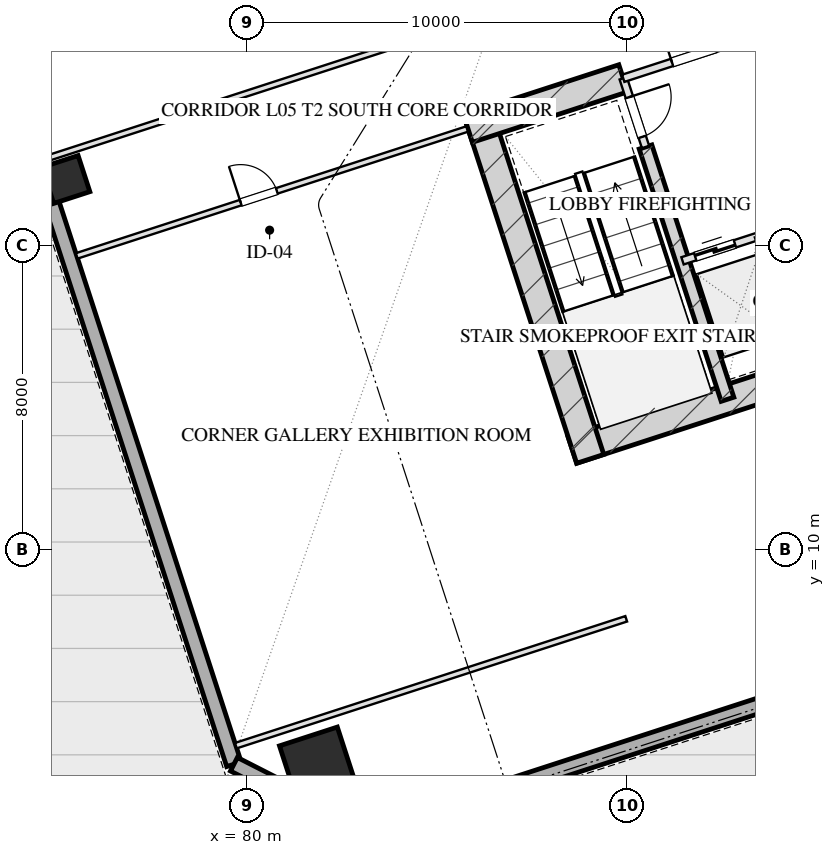
"""IFC4 building model, lengths in metres.
Left out: names, types, materials, properties, quantities, classifications, styles, units other than length and angle.
Written with IfcOpenShell. Run it as: python <this file> out.ifc"""

import sys

from ifc_helpers import new_model, si_unit, direction, frame, frame_2d, origin, origin_2d, place, context, subcontext, project, spatial, rectangle, hollow_rectangle, extrude, element, fill, save


model = new_model("IFC4")
c1 = context("Model", 3, precision=1e-05, world=origin(), true_north=direction((0.0, 1.0)))
c2 = subcontext(c1, "Body", "Model", "MODEL_VIEW")
j1 = project(units=[si_unit("LENGTHUNIT", "METRE"), si_unit("PLANEANGLEUNIT", "RADIAN")], contexts=[c1])
p1 = place(None, origin())
s1 = spatial("IfcSite", under=j1, at=p1, CompositionType="ELEMENT")
p2 = place(p1, origin())
s2 = spatial("IfcBuilding", under=s1, at=p2, CompositionType="ELEMENT")
p3 = place(p2, frame((0.0, 0.0, 26.0)))
s3 = spatial("IfcBuildingStorey", under=s2, at=p3, CompositionType="ELEMENT", Elevation=26.0)
p4 = place(p3, frame((88.559, 12.629, 0.0), z_axis=(0.0, 0.0, 1.0), x_axis=(0.951056072937, 0.309018358888, 0.0)))
e1 = element("IfcWall", 1, at=p4, inside=s3, PredefinedType="SHEAR", context=c2, shape_type="SweptSolid", body=[
    extrude(rectangle(XDim=16.55, YDim=0.75, at=frame_2d((8.275, 0.0))), origin(), (0.0, 0.0, 1.0), 4.0),
])
p5 = place(p3, frame((86.055, 21.546, 0.0), z_axis=(0.0, 0.0, 1.0), x_axis=(0.309023585745, -0.951054374604, 0.0)))
e2 = element("IfcWall", 2, at=p5, inside=s3, PredefinedType="SHEAR", context=c2, shape_type="SweptSolid", body=[
    extrude(rectangle(XDim=9.63, YDim=0.75, at=frame_2d((4.815, 0.0))), origin(), (0.0, 0.0, 1.0), 4.0),
])
p6 = place(p3, frame((90.486, 20.594, 0.0), z_axis=(0.0, 0.0, 1.0), x_axis=(0.309020428229, -0.951055400562, 0.0)))
e3 = element("IfcWall", 3, at=p6, inside=s3, PredefinedType="SHEAR", context=c2, shape_type="SweptSolid", body=[
    extrude(rectangle(XDim=6.98, YDim=0.35, at=frame_2d((3.49, 0.0))), origin(), (0.0, 0.0, 1.0), 4.0),
])
p7 = place(p3, frame((85.814, 21.074, 0.0), z_axis=(0.0, 0.0, 1.0), x_axis=(0.95106580992, 0.308988390074, 0.0)))
e4 = element("IfcWall", 4, at=p7, inside=s3, PredefinedType="SHEAR", context=c2, shape_type="SweptSolid", body=[
    extrude(rectangle(XDim=4.295, YDim=0.75, at=frame_2d((2.147, 0.0))), origin(), (0.0, 0.0, 1.0), 4.0),
])
p8 = place(p3, frame((81.863, 4.323, 0.0), z_axis=(0.0, 0.0, 1.0), x_axis=(0.951056516295, 0.309016994375, 0.0)))
e5 = element("IfcColumn", 5, at=p8, inside=s3, PredefinedType="COLUMN", context=c2, shape_type="SweptSolid", body=[
    extrude(hollow_rectangle(XDim=1.6, YDim=1.6, WallThickness=0.055, at=origin_2d()), origin(), (0.0, 0.0, 1.0), 4.001),
])
p9 = place(p3, frame((75.234, 19.739, 0.0), z_axis=(0.0, 0.0, 1.0), x_axis=(0.951056516295, 0.309016994375, 0.0)))
e6 = element("IfcColumn", 6, at=p9, inside=s3, PredefinedType="COLUMN", context=c2, shape_type="SweptSolid", body=[
    extrude(hollow_rectangle(XDim=1.0, YDim=1.0, WallThickness=0.036, at=origin_2d()), origin(), (0.0, 0.0, 1.0), 4.001),
])
p10 = place(p3, frame((79.655, 4.352, 0.0), z_axis=(0.0, 0.0, 1.0), x_axis=(-0.309014526607, 0.951057318118, 0.0)))
e7 = element("IfcWall", 7, at=p10, inside=s3, PredefinedType="SOLIDWALL", context=c2, shape_type="SweptSolid", body=[
    extrude(rectangle(XDim=50.0, YDim=0.4, at=frame_2d((25.0, 0.0))), origin(), (0.0, 0.0, 1.0), 3.16),
])
p11 = place(p10, frame((17.35, 0.0, 0.75)))
e8 = element("IfcOpeningElement", 8, at=p11, cuts=e7, PredefinedType="OPENING", context=c2, shape_type="SweptSolid", body=[
    extrude(rectangle(XDim=2.5, YDim=1.75, at=frame_2d((1.25, 0.875))), frame((0.0, 0.21, 0.0), z_axis=(0.0, -1.0, 0.0), x_axis=(1.0, 0.0, 0.0)), (0.0, 0.0, 1.0), 0.42),
])
p12 = place(p10, frame((21.15, 0.0, 0.75)))
e9 = element("IfcOpeningElement", 9, at=p12, cuts=e7, PredefinedType="OPENING", context=c2, shape_type="SweptSolid", body=[
    extrude(rectangle(XDim=2.5, YDim=1.75, at=frame_2d((1.25, 0.875))), frame((0.0, 0.21, 0.0), z_axis=(0.0, -1.0, 0.0), x_axis=(1.0, 0.0, 0.0)), (0.0, 0.0, 1.0), 0.42),
])
p13 = place(p10, frame((26.35, 0.0, 0.75)))
e10 = element("IfcOpeningElement", 10, at=p13, cuts=e7, PredefinedType="OPENING", context=c2, shape_type="SweptSolid", body=[
    extrude(rectangle(XDim=2.5, YDim=1.75, at=frame_2d((1.25, 0.875))), frame((0.0, 0.21, 0.0), z_axis=(0.0, -1.0, 0.0), x_axis=(1.0, 0.0, 0.0)), (0.0, 0.0, 1.0), 0.42),
])
p14 = place(p10, frame((30.15, 0.0, 0.75)))
e11 = element("IfcOpeningElement", 11, at=p14, cuts=e7, PredefinedType="OPENING", context=c2, shape_type="SweptSolid", body=[
    extrude(rectangle(XDim=2.5, YDim=1.75, at=frame_2d((1.25, 0.875))), frame((0.0, 0.21, 0.0), z_axis=(0.0, -1.0, 0.0), x_axis=(1.0, 0.0, 0.0)), (0.0, 0.0, 1.0), 0.42),
])
p15 = place(p3, frame((113.998, 12.567, 0.0), z_axis=(0.0, 0.0, 1.0), x_axis=(-0.951055939317, -0.309018770125, 0.0)))
e12 = element("IfcWall", 12, at=p15, inside=s3, PredefinedType="SOLIDWALL", context=c2, shape_type="SweptSolid", body=[
    extrude(rectangle(XDim=32.4, YDim=0.4, at=frame_2d((16.2, 0.0))), origin(), (0.0, 0.0, 1.0), 3.16),
])
p16 = place(p3, frame((83.184, 2.554, 0.0), z_axis=(0.0, 0.0, 1.0), x_axis=(-0.890998089617, 0.454007053137, 0.0)))
e13 = element("IfcWall", 13, at=p16, inside=s3, PredefinedType="SOLIDWALL", context=c2, shape_type="SweptSolid", body=[
    extrude(rectangle(XDim=3.96, YDim=0.4, at=frame_2d((1.98, 0.0))), origin(), (0.0, 0.0, 1.0), 3.16),
])
p17 = place(p3, frame((89.899, 22.401, 0.0), z_axis=(0.0, 0.0, 1.0), x_axis=(0.308932062672, -0.951084108086, 0.0)))
e14 = element("IfcWall", 14, at=p17, inside=s3, PredefinedType="PARTITIONING", context=c2, shape_type="SweptSolid", body=[
    extrude(rectangle(XDim=1.9, YDim=0.2, at=frame_2d((0.95, 0.0))), origin(), (0.0, 0.0, 1.0), 3.725),
])
p18 = place(p17, frame((0.52, 0.0, 0.0)))
e15 = element("IfcOpeningElement", 15, at=p18, cuts=e14, PredefinedType="OPENING", context=c2, shape_type="SweptSolid", body=[
    extrude(rectangle(XDim=1.1, YDim=2.05, at=frame_2d((0.55, 1.025))), frame((0.0, 0.11, 0.0), z_axis=(0.0, -1.0, 0.0), x_axis=(1.0, 0.0, 0.0)), (0.0, 0.0, 1.0), 0.22),
])
p19 = place(p3, frame((89.899, 22.401, 0.0), z_axis=(0.0, 0.0, 1.0), x_axis=(0.951046716504, 0.309047153403, 0.0)))
e16 = element("IfcWall", 16, at=p19, inside=s3, PredefinedType="PARTITIONING", context=c2, shape_type="SweptSolid", body=[
    extrude(rectangle(XDim=3.83, YDim=0.2, at=frame_2d((1.915, 0.0))), origin(), (0.0, 0.0, 1.0), 3.725),
])
p20 = place(p19, frame((1.35, 0.0, 0.0)))
e17 = element("IfcOpeningElement", 17, at=p20, cuts=e16, PredefinedType="OPENING", context=c2, shape_type="SweptSolid", body=[
    extrude(rectangle(XDim=1.2, YDim=2.05, at=frame_2d((0.6, 1.025))), frame((0.0, 0.11, 0.0), z_axis=(0.0, -1.0, 0.0), x_axis=(1.0, 0.0, 0.0)), (0.0, 0.0, 1.0), 0.22),
])
p21 = place(p3, frame((91.46, 17.598, 0.0), z_axis=(0.0, 0.0, 1.0), x_axis=(0.951062257173, 0.308999325213, 0.0)))
e18 = element("IfcWall", 18, at=p21, inside=s3, PredefinedType="PARTITIONING", context=c2, shape_type="SweptSolid", body=[
    extrude(rectangle(XDim=2.1, YDim=0.2, at=frame_2d((1.05, 0.0))), origin(), (0.0, 0.0, 1.0), 3.725),
])
p22 = place(p21, frame((0.35, 0.0, 0.0)))
e19 = element("IfcOpeningElement", 19, at=p22, cuts=e18, PredefinedType="OPENING", context=c2, shape_type="SweptSolid", body=[
    extrude(rectangle(XDim=1.1, YDim=2.05, at=frame_2d((0.55, 1.025))), frame((0.0, 0.11, 0.0), z_axis=(0.0, -1.0, 0.0), x_axis=(1.0, 0.0, 0.0)), (0.0, 0.0, 1.0), 0.22),
])
p23 = place(p3, frame((93.457, 18.247, 0.0), z_axis=(0.0, 0.0, 1.0), x_axis=(0.3089935693, -0.951064127245, 0.0)))
e20 = element("IfcWall", 20, at=p23, inside=s3, PredefinedType="PARTITIONING", context=c2, shape_type="SweptSolid", body=[
    extrude(rectangle(XDim=3.7, YDim=0.2, at=frame_2d((1.85, 0.0))), origin(), (0.0, 0.0, 1.0), 3.725),
])
p24 = place(p3, frame((79.707, 4.842, 0.0), z_axis=(0.0, 0.0, 1.0), x_axis=(0.951056658866, 0.309016555588, 0.0)))
e21 = element("IfcWall", 21, at=p24, inside=s3, PredefinedType="PARTITIONING", context=c2, shape_type="SweptSolid", body=[
    extrude(rectangle(XDim=10.8, YDim=0.15, at=frame_2d((5.4, 0.0))), origin(), (0.0, 0.0, 1.0), 3.725),
])
p25 = place(p3, frame((75.519, 17.729, 0.0), z_axis=(0.0, 0.0, 1.0), x_axis=(0.951056658866, 0.309016555588, 0.0)))
e22 = element("IfcWall", 22, at=p25, inside=s3, PredefinedType="PARTITIONING", context=c2, shape_type="SweptSolid", body=[
    extrude(rectangle(XDim=10.8, YDim=0.15, at=frame_2d((5.4, 0.0))), origin(), (0.0, 0.0, 1.0), 3.725),
])
p26 = place(p25, frame((4.536, 0.0, 0.0)))
e23 = element("IfcOpeningElement", 23, at=p26, cuts=e22, PredefinedType="OPENING", context=c2, shape_type="SweptSolid", body=[
    extrude(rectangle(XDim=1.0, YDim=2.05, at=frame_2d((0.5, 1.025))), frame((0.0, 0.085, 0.0), z_axis=(0.0, -1.0, 0.0), x_axis=(1.0, 0.0, 0.0)), (0.0, 0.0, 1.0), 0.17),
])
p27 = place(p3, frame((74.691, 20.278, 0.0), z_axis=(0.0, 0.0, 1.0), x_axis=(0.951052712421, 0.309028701251, 0.0)))
e24 = element("IfcWall", 24, at=p27, inside=s3, PredefinedType="PARTITIONING", context=c2, shape_type="SweptSolid", body=[
    extrude(rectangle(XDim=13.375, YDim=0.15, at=frame_2d((6.688, 0.0))), origin(), (0.0, 0.0, 1.0), 3.725),
])
p28 = place(p18, origin())
e25 = element("IfcDoor", 25, at=p28, inside=s3, OperationType="SINGLE_SWING_LEFT", PredefinedType="DOOR", context=c2, shape_type="SweptSolid", body=[
    extrude(rectangle(XDim=1.1, YDim=2.05, at=frame_2d((0.55, 1.025))), frame((0.0, 0.025, 0.0), z_axis=(0.0, -1.0, 0.0), x_axis=(1.0, 0.0, 0.0)), (0.0, 0.0, 1.0), 0.05),
])
fill(e15, e25)
p29 = place(p20, origin())
e26 = element("IfcDoor", 26, at=p29, inside=s3, OperationType="SINGLE_SWING_LEFT", PredefinedType="DOOR", context=c2, shape_type="SweptSolid", body=[
    extrude(rectangle(XDim=1.2, YDim=2.05, at=frame_2d((0.6, 1.025))), frame((0.0, 0.025, 0.0), z_axis=(0.0, -1.0, 0.0), x_axis=(1.0, 0.0, 0.0)), (0.0, 0.0, 1.0), 0.05),
])
fill(e17, e26)
p30 = place(p22, origin())
e27 = element("IfcDoor", 27, at=p30, inside=s3, OperationType="DOUBLE_DOOR_SLIDING", PredefinedType="DOOR", context=c2, shape_type="SweptSolid", body=[
    extrude(rectangle(XDim=1.1, YDim=2.05, at=frame_2d((0.55, 1.025))), frame((0.0, 0.025, 0.0), z_axis=(0.0, -1.0, 0.0), x_axis=(1.0, 0.0, 0.0)), (0.0, 0.0, 1.0), 0.05),
])
fill(e19, e27)
p31 = place(p26, origin())
e28 = element("IfcDoor", 28, at=p31, inside=s3, OperationType="SINGLE_SWING_LEFT", PredefinedType="DOOR", context=c2, shape_type="SweptSolid", body=[
    extrude(rectangle(XDim=1.0, YDim=2.05, at=frame_2d((0.5, 1.025))), frame((0.0, 0.025, 0.0), z_axis=(0.0, -1.0, 0.0), x_axis=(1.0, 0.0, 0.0)), (0.0, 0.0, 1.0), 0.05),
])
fill(e23, e28)
save(model, sys.argv[1])
